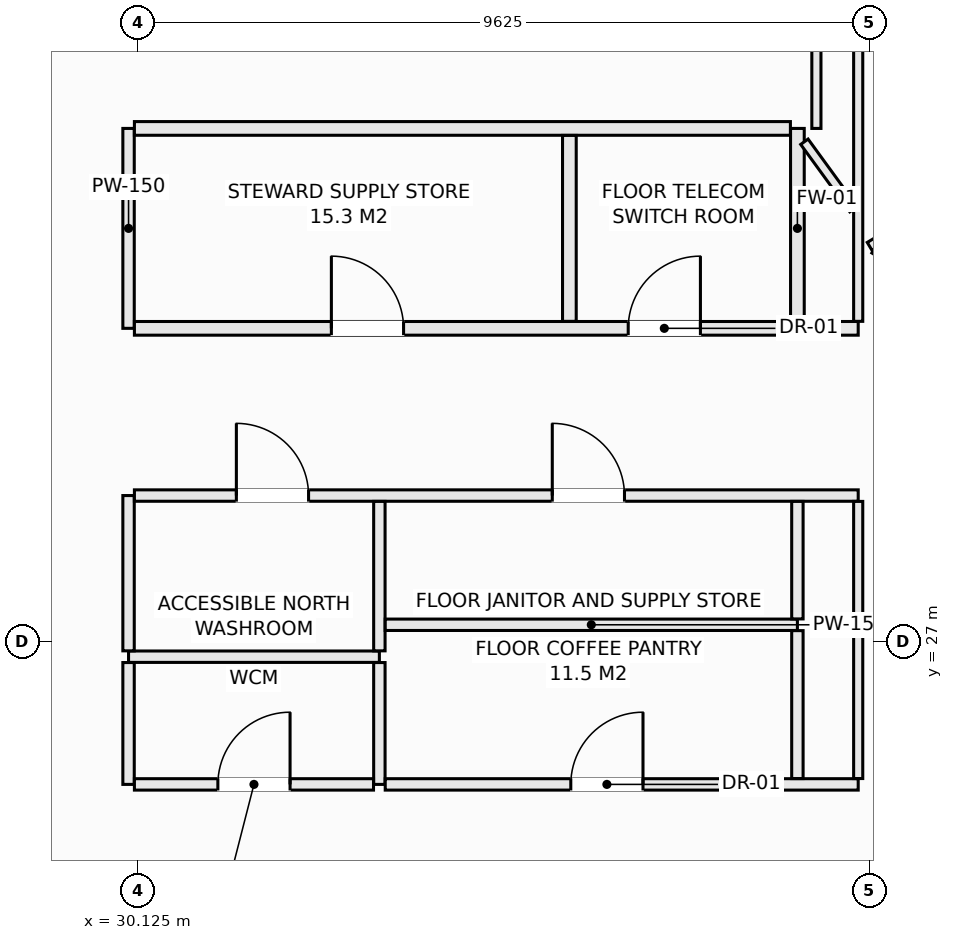
"""IFC4 building model, lengths in metres.
Left out: names, types, materials, properties, quantities, classifications, styles, units other than length and angle.
Written with IfcOpenShell. Run it as: python <this file> out.ifc"""

import sys

from ifc_helpers import new_model, si_unit, direction, frame, frame_2d, origin, place, context, subcontext, project, spatial, rectangle, extrude, element, fill, save


model = new_model("IFC4")
c1 = context("Model", 3, precision=1e-05, world=origin(), true_north=direction((0.0, 1.0)))
c2 = subcontext(c1, "Body", "Model", "MODEL_VIEW")
j1 = project(units=[si_unit("LENGTHUNIT", "METRE"), si_unit("PLANEANGLEUNIT", "RADIAN")], contexts=[c1])
p1 = place(None, origin())
s1 = spatial("IfcSite", under=j1, at=p1, CompositionType="ELEMENT")
p2 = place(p1, origin())
s2 = spatial("IfcBuilding", under=s1, at=p2, CompositionType="ELEMENT")
p3 = place(p2, frame((0.0, 0.0, 245.9)))
s3 = spatial("IfcBuildingStorey", under=s2, at=p3, CompositionType="ELEMENT", Elevation=245.9)
p4 = place(p3, frame((30.0, 26.8, 0.0), z_axis=(0.0, 0.0, 1.0), x_axis=(1.0, 0.0, 0.0)))
e1 = element("IfcWall", 1, at=p4, inside=s3, PredefinedType="PARTITIONING", context=c2, shape_type="SweptSolid", body=[
    extrude(rectangle(XDim=3.3, YDim=0.15, at=frame_2d((1.65, 0.0))), origin(), (0.0, 0.0, 1.0), 3.03),
])
p5 = place(p3, frame((30.0, 25.12, 0.0), z_axis=(0.0, 0.0, 1.0), x_axis=(0.0, 1.0, 0.0)))
e2 = element("IfcWall", 2, at=p5, inside=s3, PredefinedType="PARTITIONING", context=c2, shape_type="SweptSolid", body=[
    extrude(rectangle(XDim=1.603, YDim=0.15, at=frame_2d((0.801, 0.0))), origin(), (0.0, 0.0, 1.0), 3.03),
])
p6 = place(p3, frame((30.0, 26.877, 0.0), z_axis=(0.0, 0.0, 1.0), x_axis=(0.0, 1.0, 0.0)))
e3 = element("IfcWall", 3, at=p6, inside=s3, PredefinedType="PARTITIONING", context=c2, shape_type="SweptSolid", body=[
    extrude(rectangle(XDim=2.043, YDim=0.15, at=frame_2d((1.021, 0.0))), origin(), (0.0, 0.0, 1.0), 3.03),
])
p7 = place(p3, frame((30.0, 31.12, 0.0), z_axis=(0.0, 0.0, 1.0), x_axis=(0.0, 1.0, 0.0)))
e4 = element("IfcWall", 4, at=p7, inside=s3, PredefinedType="PARTITIONING", context=c2, shape_type="SweptSolid", body=[
    extrude(rectangle(XDim=2.63, YDim=0.15, at=frame_2d((1.315, 0.0))), origin(), (0.0, 0.0, 1.0), 3.03),
])
p8 = place(p3, frame((30.077, 28.92, 0.0), z_axis=(0.0, 0.0, 1.0), x_axis=(1.0, 0.0, 0.0)))
e5 = element("IfcWall", 5, at=p8, inside=s3, PredefinedType="PARTITIONING", context=c2, shape_type="SweptSolid", body=[
    extrude(rectangle(XDim=9.523, YDim=0.15, at=frame_2d((4.762, 0.0))), origin(), (0.0, 0.0, 1.0), 3.03),
])
p9 = place(p8, frame((1.342, 0.0, 0.0)))
e6 = element("IfcOpeningElement", 6, at=p9, cuts=e5, PredefinedType="OPENING", context=c2, shape_type="SweptSolid", body=[
    extrude(rectangle(XDim=0.95, YDim=2.1, at=frame_2d((0.475, 1.05))), frame((0.0, 0.085, 0.0), z_axis=(0.0, -1.0, 0.0), x_axis=(1.0, 0.0, 0.0)), (0.0, 0.0, 1.0), 0.17),
])
p10 = place(p8, frame((5.498, 0.0, 0.0)))
e7 = element("IfcOpeningElement", 7, at=p10, cuts=e5, PredefinedType="OPENING", context=c2, shape_type="SweptSolid", body=[
    extrude(rectangle(XDim=0.95, YDim=2.1, at=frame_2d((0.475, 1.05))), frame((0.0, 0.085, 0.0), z_axis=(0.0, -1.0, 0.0), x_axis=(1.0, 0.0, 0.0)), (0.0, 0.0, 1.0), 0.17),
])
p11 = place(p3, frame((33.3, 25.12, 0.0), z_axis=(0.0, 0.0, 1.0), x_axis=(0.0, 1.0, 0.0)))
e8 = element("IfcWall", 8, at=p11, inside=s3, PredefinedType="PARTITIONING", context=c2, shape_type="SweptSolid", body=[
    extrude(rectangle(XDim=1.603, YDim=0.15, at=frame_2d((0.801, 0.0))), origin(), (0.0, 0.0, 1.0), 3.03),
])
p12 = place(p3, frame((33.3, 26.877, 0.0), z_axis=(0.0, 0.0, 1.0), x_axis=(0.0, 1.0, 0.0)))
e9 = element("IfcWall", 9, at=p12, inside=s3, PredefinedType="PARTITIONING", context=c2, shape_type="SweptSolid", body=[
    extrude(rectangle(XDim=1.966, YDim=0.15, at=frame_2d((0.983, 0.0))), origin(), (0.0, 0.0, 1.0), 3.03),
])
p13 = place(p3, frame((30.077, 25.12, 0.0), z_axis=(0.0, 0.0, 1.0), x_axis=(1.0, 0.0, 0.0)))
e10 = element("IfcWall", 10, at=p13, inside=s3, PredefinedType="PARTITIONING", context=c2, shape_type="SweptSolid", body=[
    extrude(rectangle(XDim=3.146, YDim=0.15, at=frame_2d((1.573, 0.0))), origin(), (0.0, 0.0, 1.0), 3.03),
])
p14 = place(p13, frame((1.098, 0.0, 0.0)))
e11 = element("IfcOpeningElement", 11, at=p14, cuts=e10, PredefinedType="OPENING", context=c2, shape_type="SweptSolid", body=[
    extrude(rectangle(XDim=0.95, YDim=2.1, at=frame_2d((0.475, 1.05))), frame((0.0, 0.085, 0.0), z_axis=(0.0, -1.0, 0.0), x_axis=(1.0, 0.0, 0.0)), (0.0, 0.0, 1.0), 0.17),
])
p15 = place(p3, frame((33.377, 25.12, 0.0), z_axis=(0.0, 0.0, 1.0), x_axis=(1.0, 0.0, 0.0)))
e12 = element("IfcWall", 12, at=p15, inside=s3, PredefinedType="PARTITIONING", context=c2, shape_type="SweptSolid", body=[
    extrude(rectangle(XDim=6.223, YDim=0.15, at=frame_2d((3.112, 0.0))), origin(), (0.0, 0.0, 1.0), 3.03),
])
p16 = place(p15, frame((2.441, 0.0, 0.0)))
e13 = element("IfcOpeningElement", 13, at=p16, cuts=e12, PredefinedType="OPENING", context=c2, shape_type="SweptSolid", body=[
    extrude(rectangle(XDim=0.95, YDim=2.1, at=frame_2d((0.475, 1.05))), frame((0.0, 0.085, 0.0), z_axis=(0.0, -1.0, 0.0), x_axis=(1.0, 0.0, 0.0)), (0.0, 0.0, 1.0), 0.17),
])
p17 = place(p3, frame((33.377, 27.22, 0.0), z_axis=(0.0, 0.0, 1.0), x_axis=(1.0, 0.0, 0.0)))
e14 = element("IfcWall", 14, at=p17, inside=s3, PredefinedType="PARTITIONING", context=c2, shape_type="SweptSolid", body=[
    extrude(rectangle(XDim=5.423, YDim=0.15, at=frame_2d((2.711, 0.0))), origin(), (0.0, 0.0, 1.0), 3.03),
])
p18 = place(p3, frame((38.8, 25.197, 0.0), z_axis=(0.0, 0.0, 1.0), x_axis=(0.0, 1.0, 0.0)))
e15 = element("IfcWall", 15, at=p18, inside=s3, PredefinedType="PARTITIONING", context=c2, shape_type="SweptSolid", body=[
    extrude(rectangle(XDim=1.946, YDim=0.15, at=frame_2d((0.973, 0.0))), origin(), (0.0, 0.0, 1.0), 3.03),
])
p19 = place(p3, frame((38.8, 27.297, 0.0), z_axis=(0.0, 0.0, 1.0), x_axis=(0.0, 1.0, 0.0)))
e16 = element("IfcWall", 16, at=p19, inside=s3, PredefinedType="PARTITIONING", context=c2, shape_type="SweptSolid", body=[
    extrude(rectangle(XDim=1.546, YDim=0.15, at=frame_2d((0.773, 0.0))), origin(), (0.0, 0.0, 1.0), 3.03),
])
p20 = place(p3, frame((38.8, 31.12, 0.0), z_axis=(0.0, 0.0, 1.0), x_axis=(0.0, 1.0, 0.0)))
e17 = element("IfcWall", 17, at=p20, inside=s3, PredefinedType="SOLIDWALL", context=c2, shape_type="SweptSolid", body=[
    extrude(rectangle(XDim=2.63, YDim=0.18, at=frame_2d((1.315, 0.0))), origin(), (0.0, 0.0, 1.0), 3.03),
])
p21 = place(p3, frame((30.077, 31.12, 0.0), z_axis=(0.0, 0.0, 1.0), x_axis=(1.0, 0.0, 0.0)))
e18 = element("IfcWall", 18, at=p21, inside=s3, PredefinedType="SOLIDWALL", context=c2, shape_type="SweptSolid", body=[
    extrude(rectangle(XDim=8.631, YDim=0.18, at=frame_2d((4.315, 0.0))), origin(), (0.0, 0.0, 1.0), 3.03),
])
p22 = place(p21, frame((2.592, 0.0, 0.0)))
e19 = element("IfcOpeningElement", 19, at=p22, cuts=e18, PredefinedType="OPENING", context=c2, shape_type="SweptSolid", body=[
    extrude(rectangle(XDim=0.95, YDim=2.1, at=frame_2d((0.475, 1.05))), frame((0.0, 0.1, 0.0), z_axis=(0.0, -1.0, 0.0), x_axis=(1.0, 0.0, 0.0)), (0.0, 0.0, 1.0), 0.2),
])
p23 = place(p21, frame((6.497, 0.0, 0.0)))
e20 = element("IfcOpeningElement", 20, at=p23, cuts=e18, PredefinedType="OPENING", context=c2, shape_type="SweptSolid", body=[
    extrude(rectangle(XDim=0.95, YDim=2.1, at=frame_2d((0.475, 1.05))), frame((0.0, 0.1, 0.0), z_axis=(0.0, -1.0, 0.0), x_axis=(1.0, 0.0, 0.0)), (0.0, 0.0, 1.0), 0.2),
])
p24 = place(p3, frame((38.892, 31.12, 0.0), z_axis=(0.0, 0.0, 1.0), x_axis=(1.0, 0.0, 0.0)))
e21 = element("IfcWall", 21, at=p24, inside=s3, PredefinedType="SOLIDWALL", context=c2, shape_type="SweptSolid", body=[
    extrude(rectangle(XDim=0.708, YDim=0.18, at=frame_2d((0.354, 0.0))), origin(), (0.0, 0.0, 1.0), 3.03),
])
p25 = place(p3, frame((30.077, 33.75, 0.0), z_axis=(0.0, 0.0, 1.0), x_axis=(1.0, 0.0, 0.0)))
e22 = element("IfcWall", 22, at=p25, inside=s3, PredefinedType="SOLIDWALL", context=c2, shape_type="SweptSolid", body=[
    extrude(rectangle(XDim=8.631, YDim=0.18, at=frame_2d((4.315, 0.0))), origin(), (0.0, 0.0, 1.0), 3.03),
])
p26 = place(p3, frame((35.8, 31.212, 0.0), z_axis=(0.0, 0.0, 1.0), x_axis=(0.0, 1.0, 0.0)))
e23 = element("IfcWall", 23, at=p26, inside=s3, PredefinedType="SOLIDWALL", context=c2, shape_type="SweptSolid", body=[
    extrude(rectangle(XDim=2.446, YDim=0.18, at=frame_2d((1.223, 0.0))), origin(), (0.0, 0.0, 1.0), 3.03),
])
p27 = place(p3, frame((39.05, 33.75, 0.0), z_axis=(0.0, 0.0, 1.0), x_axis=(0.0, 1.0, 0.0)))
e24 = element("IfcWall", 24, at=p27, inside=s3, PredefinedType="PARTITIONING", context=c2, shape_type="SweptSolid", body=[
    extrude(rectangle(XDim=1.938, YDim=0.12, at=frame_2d((0.969, 0.0))), origin(), (0.0, 0.0, 1.0), 3.03),
])
p28 = place(p3, frame((39.6, 25.197, 0.0), z_axis=(0.0, 0.0, 1.0), x_axis=(0.0, 1.0, 0.0)))
e25 = element("IfcWall", 25, at=p28, inside=s3, PredefinedType="PARTITIONING", context=c2, shape_type="SweptSolid", body=[
    extrude(rectangle(XDim=3.646, YDim=0.12, at=frame_2d((1.823, 0.0))), origin(), (0.0, 0.0, 1.0), 3.03),
])
p29 = place(p3, frame((39.6, 31.212, 0.0), z_axis=(0.0, 0.0, 1.0), x_axis=(0.0, 1.0, 0.0)))
e26 = element("IfcWall", 26, at=p29, inside=s3, PredefinedType="PARTITIONING", context=c2, shape_type="SweptSolid", body=[
    extrude(rectangle(XDim=7.871, YDim=0.12, at=frame_2d((3.936, 0.0))), origin(), (0.0, 0.0, 1.0), 3.03),
])
p30 = place(p29, frame((4.706, 0.0, 0.0)))
e27 = element("IfcOpeningElement", 27, at=p30, cuts=e26, PredefinedType="OPENING", context=c2, shape_type="SweptSolid", body=[
    extrude(rectangle(XDim=0.95, YDim=2.1, at=frame_2d((0.475, 1.05))), frame((0.0, 0.07, 0.0), z_axis=(0.0, -1.0, 0.0), x_axis=(1.0, 0.0, 0.0)), (0.0, 0.0, 1.0), 0.14),
])
p31 = place(p3, frame((39.75, 32.199, 0.0), z_axis=(0.0, 0.0, 1.0), x_axis=(0.857702120906, 0.514146935996, 0.0)))
e28 = element("IfcWall", 28, at=p31, inside=s3, PredefinedType="PARTITIONING", context=c2, shape_type="SweptSolid", body=[
    extrude(rectangle(XDim=1.441, YDim=0.12, at=frame_2d((0.721, 0.0))), origin(), (0.0, 0.0, 1.0), 3.03),
])
p32 = place(p3, frame((39.81, 32.163, 0.0), z_axis=(0.0, 0.0, 1.0), x_axis=(0.858011245414, -0.513630901273, 0.0)))
e29 = element("IfcWall", 29, at=p32, inside=s3, PredefinedType="PARTITIONING", context=c2, shape_type="SweptSolid", body=[
    extrude(rectangle(XDim=1.37, YDim=0.12, at=frame_2d((0.685, 0.0))), origin(), (0.0, 0.0, 1.0), 3.03),
])
p33 = place(p3, frame((38.892, 33.575, 0.0), z_axis=(0.0, 0.0, 1.0), x_axis=(0.5886213307, -0.808408887287, 0.0)))
e30 = element("IfcWall", 30, at=p33, inside=s3, PredefinedType="PARTITIONING", context=c2, shape_type="SweptSolid", body=[
    extrude(rectangle(XDim=1.097, YDim=0.12, at=frame_2d((0.549, 0.0))), origin(), (0.0, 0.0, 1.0), 3.03),
])
p34 = place(p9, origin())
e31 = element("IfcDoor", 31, at=p34, inside=s3, OperationType="SINGLE_SWING_LEFT", PredefinedType="DOOR", context=c2, shape_type="SweptSolid", body=[
    extrude(rectangle(XDim=0.95, YDim=2.1, at=frame_2d((0.475, 1.05))), frame((0.0, 0.025, 0.0), z_axis=(0.0, -1.0, 0.0), x_axis=(1.0, 0.0, 0.0)), (0.0, 0.0, 1.0), 0.05),
])
fill(e6, e31)
p35 = place(p14, origin())
e32 = element("IfcDoor", 32, at=p35, inside=s3, OperationType="SINGLE_SWING_RIGHT", PredefinedType="DOOR", context=c2, shape_type="SweptSolid", body=[
    extrude(rectangle(XDim=0.95, YDim=2.1, at=frame_2d((0.475, 1.05))), frame((0.0, 0.025, 0.0), z_axis=(0.0, -1.0, 0.0), x_axis=(1.0, 0.0, 0.0)), (0.0, 0.0, 1.0), 0.05),
])
fill(e11, e32)
p36 = place(p10, origin())
e33 = element("IfcDoor", 33, at=p36, inside=s3, OperationType="SINGLE_SWING_LEFT", PredefinedType="DOOR", context=c2, shape_type="SweptSolid", body=[
    extrude(rectangle(XDim=0.95, YDim=2.1, at=frame_2d((0.475, 1.05))), frame((0.0, 0.025, 0.0), z_axis=(0.0, -1.0, 0.0), x_axis=(1.0, 0.0, 0.0)), (0.0, 0.0, 1.0), 0.05),
])
fill(e7, e33)
p37 = place(p16, origin())
e34 = element("IfcDoor", 34, at=p37, inside=s3, OperationType="SINGLE_SWING_RIGHT", PredefinedType="DOOR", context=c2, shape_type="SweptSolid", body=[
    extrude(rectangle(XDim=0.95, YDim=2.1, at=frame_2d((0.475, 1.05))), frame((0.0, 0.025, 0.0), z_axis=(0.0, -1.0, 0.0), x_axis=(1.0, 0.0, 0.0)), (0.0, 0.0, 1.0), 0.05),
])
fill(e13, e34)
p38 = place(p22, origin())
e35 = element("IfcDoor", 35, at=p38, inside=s3, OperationType="SINGLE_SWING_LEFT", PredefinedType="DOOR", context=c2, shape_type="SweptSolid", body=[
    extrude(rectangle(XDim=0.95, YDim=2.1, at=frame_2d((0.475, 1.05))), frame((0.0, 0.025, 0.0), z_axis=(0.0, -1.0, 0.0), x_axis=(1.0, 0.0, 0.0)), (0.0, 0.0, 1.0), 0.05),
])
fill(e19, e35)
p39 = place(p23, origin())
e36 = element("IfcDoor", 36, at=p39, inside=s3, OperationType="SINGLE_SWING_RIGHT", PredefinedType="DOOR", context=c2, shape_type="SweptSolid", body=[
    extrude(rectangle(XDim=0.95, YDim=2.1, at=frame_2d((0.475, 1.05))), frame((0.0, 0.025, 0.0), z_axis=(0.0, -1.0, 0.0), x_axis=(1.0, 0.0, 0.0)), (0.0, 0.0, 1.0), 0.05),
])
fill(e20, e36)
save(model, sys.argv[1])
